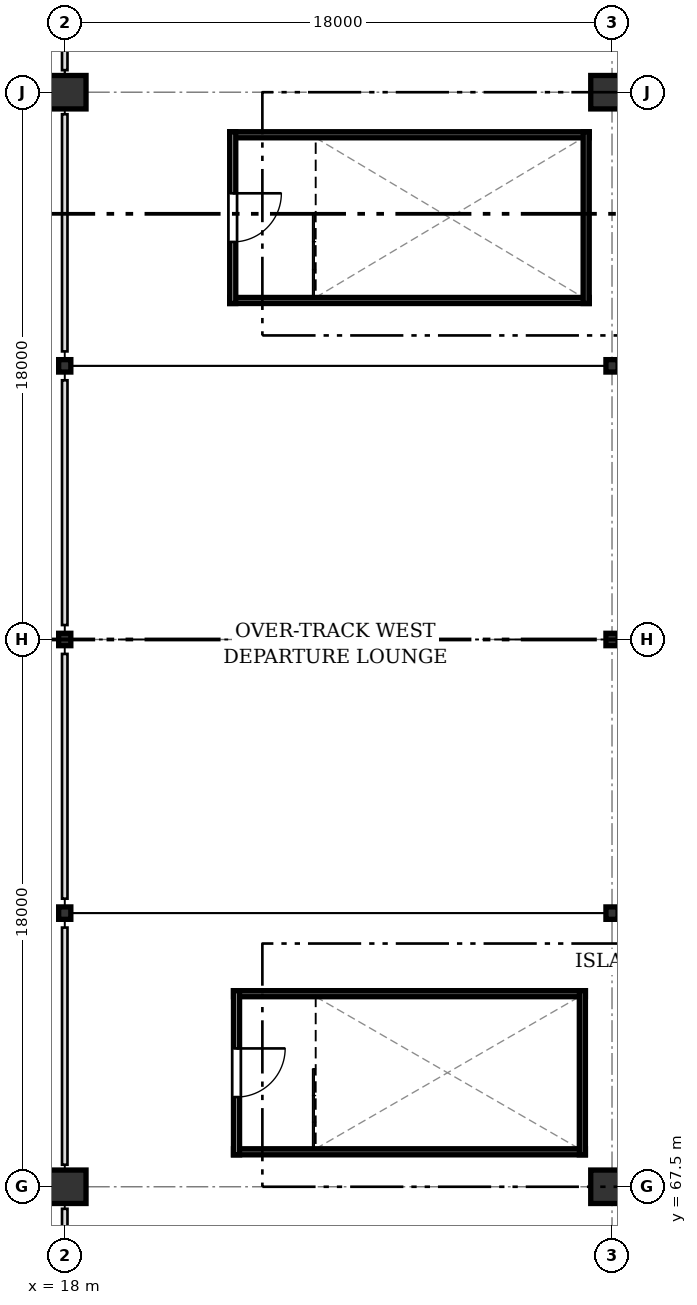
"""IFC4 building model, lengths in metres.
Left out: names, types, materials, properties, quantities, classifications, styles, units other than length and angle.
Written with IfcOpenShell. Run it as: python <this file> out.ifc"""

import sys

from ifc_helpers import new_model, si_unit, direction, frame, frame_2d, origin, origin_2d, place, context, subcontext, project, spatial, rectangle, i_section, extrude, element, fill, save


model = new_model("IFC4")
c1 = context("Model", 3, precision=1e-05, world=origin(), true_north=direction((0.0, 1.0)))
c2 = subcontext(c1, "Body", "Model", "MODEL_VIEW")
j1 = project(units=[si_unit("LENGTHUNIT", "METRE"), si_unit("PLANEANGLEUNIT", "RADIAN")], contexts=[c1])
p1 = place(None, origin())
s1 = spatial("IfcSite", under=j1, at=p1, CompositionType="ELEMENT")
p2 = place(p1, origin())
s2 = spatial("IfcBuilding", under=s1, at=p2, CompositionType="ELEMENT")
p3 = place(p2, frame((0.0, 0.0, 6.6)))
s3 = spatial("IfcBuildingStorey", under=s2, at=p3, CompositionType="ELEMENT", Elevation=6.6)
for number, where, z_axis, x_axis in (
    (1, (18.0, 67.5, 0.0), (0.0, 0.0, 1.0), (1.0, 0.0, 0.0)),
    (2, (18.0, 103.5, 0.0), (0.0, 0.0, 1.0), (1.0, 0.0, 0.0)),
    (3, (36.0, 67.5, 0.0), (0.0, 0.0, 1.0), (1.0, 0.0, 0.0)),
    (4, (36.0, 103.5, 0.0), (0.0, 0.0, 1.0), (1.0, 0.0, 0.0)),
):
    element("IfcColumn", number, at=place(p3, frame(where, z_axis=z_axis, x_axis=x_axis)), inside=s3, PredefinedType="COLUMN", context=c2, shape_type="SweptSolid", body=[
        extrude(rectangle(XDim=1.4, YDim=1.1, at=origin_2d()), origin(), (0.0, 0.0, 1.0), 4.2),
    ])
for number, where, z_axis, x_axis in (
    (5, (18.0, 76.5, -0.68), (0.0, 0.0, 1.0), (1.0, 0.0, 0.0)),
    (6, (18.0, 85.5, -0.68), (0.0, 0.0, 1.0), (1.0, 0.0, 0.0)),
    (7, (18.0, 94.5, -0.68), (0.0, 0.0, 1.0), (1.0, 0.0, 0.0)),
    (8, (36.0, 76.5, -0.68), (0.0, 0.0, 1.0), (1.0, 0.0, 0.0)),
    (9, (36.0, 85.5, -0.68), (0.0, 0.0, 1.0), (1.0, 0.0, 0.0)),
    (10, (36.0, 94.5, -0.68), (0.0, 0.0, 1.0), (1.0, 0.0, 0.0)),
):
    element("IfcColumn", number, at=place(p3, frame(where, z_axis=z_axis, x_axis=x_axis)), inside=s3, PredefinedType="COLUMN", context=c2, shape_type="SweptSolid", body=[
        extrude(i_section(OverallWidth=0.4, OverallDepth=0.408, WebThickness=0.021, FlangeThickness=0.021, FilletRadius=0.022, at=origin_2d()), origin(), (0.0, 0.0, 1.0), 4.03),
    ])
for number, where, z_axis, x_axis in (
    (11, (23.55, 68.65, 0.0), (0.0, 0.0, 1.0), (1.0, 0.0, 0.0)),
    (12, (35.125, 73.85, 0.0), (0.0, 0.0, 1.0), (-1.0, 0.0, 0.0)),
):
    element("IfcWall", number, at=place(p3, frame(where, z_axis=z_axis, x_axis=x_axis)), inside=s3, PredefinedType="SOLIDWALL", context=c2, shape_type="SweptSolid", body=[
        extrude(rectangle(XDim=11.575, YDim=0.2, at=frame_2d((5.788, 0.0))), origin(), (0.0, 0.0, 1.0), 2.45),
    ])
p4 = place(p3, frame((35.025, 68.55, 0.0), z_axis=(0.0, 0.0, 1.0), x_axis=(0.0, 1.0, 0.0)))
e13 = element("IfcWall", 13, at=p4, inside=s3, PredefinedType="SOLIDWALL", context=c2, shape_type="SweptSolid", body=[
    extrude(rectangle(XDim=5.4, YDim=0.2, at=frame_2d((2.7, 0.0))), origin(), (0.0, 0.0, 1.0), 2.45),
])
p5 = place(p3, frame((23.65, 73.95, 0.0), z_axis=(0.0, 0.0, 1.0), x_axis=(0.0, -1.0, 0.0)))
e14 = element("IfcWall", 14, at=p5, inside=s3, PredefinedType="SOLIDWALL", context=c2, shape_type="SweptSolid", body=[
    extrude(rectangle(XDim=5.4, YDim=0.2, at=frame_2d((2.7, 0.0))), origin(), (0.0, 0.0, 1.0), 2.45),
])
p6 = place(p5, frame((1.9, 0.0, 0.0)))
e15 = element("IfcOpeningElement", 15, at=p6, cuts=e14, PredefinedType="OPENING", context=c2, shape_type="SweptSolid", body=[
    extrude(rectangle(XDim=1.6, YDim=2.15, at=frame_2d((0.8, 1.075))), frame((0.0, 0.11, 0.0), z_axis=(0.0, -1.0, 0.0), x_axis=(1.0, 0.0, 0.0)), (0.0, 0.0, 1.0), 0.22),
])
for number, where, z_axis, x_axis in (
    (16, (23.425, 96.65, 0.0), (0.0, 0.0, 1.0), (1.0, 0.0, 0.0)),
    (17, (35.25, 102.1, 0.0), (0.0, 0.0, 1.0), (-1.0, 0.0, 0.0)),
):
    element("IfcWall", number, at=place(p3, frame(where, z_axis=z_axis, x_axis=x_axis)), inside=s3, PredefinedType="SOLIDWALL", context=c2, shape_type="SweptSolid", body=[
        extrude(rectangle(XDim=11.825, YDim=0.2, at=frame_2d((5.913, 0.0))), origin(), (0.0, 0.0, 1.0), 2.45),
    ])
p7 = place(p3, frame((35.15, 96.55, 0.0), z_axis=(0.0, 0.0, 1.0), x_axis=(0.0, 1.0, 0.0)))
e18 = element("IfcWall", 18, at=p7, inside=s3, PredefinedType="SOLIDWALL", context=c2, shape_type="SweptSolid", body=[
    extrude(rectangle(XDim=5.65, YDim=0.2, at=frame_2d((2.825, 0.0))), origin(), (0.0, 0.0, 1.0), 2.45),
])
p8 = place(p3, frame((23.525, 102.2, 0.0), z_axis=(0.0, 0.0, 1.0), x_axis=(0.0, -1.0, 0.0)))
e19 = element("IfcWall", 19, at=p8, inside=s3, PredefinedType="SOLIDWALL", context=c2, shape_type="SweptSolid", body=[
    extrude(rectangle(XDim=5.65, YDim=0.2, at=frame_2d((2.825, 0.0))), origin(), (0.0, 0.0, 1.0), 2.45),
])
p9 = place(p8, frame((2.025, 0.0, 0.0)))
e20 = element("IfcOpeningElement", 20, at=p9, cuts=e19, PredefinedType="OPENING", context=c2, shape_type="SweptSolid", body=[
    extrude(rectangle(XDim=1.6, YDim=2.15, at=frame_2d((0.8, 1.075))), frame((0.0, 0.11, 0.0), z_axis=(0.0, -1.0, 0.0), x_axis=(1.0, 0.0, 0.0)), (0.0, 0.0, 1.0), 0.22),
])
p10 = place(p6, origin())
e21 = element("IfcDoor", 21, at=p10, inside=s3, OperationType="SINGLE_SWING_LEFT", PredefinedType="DOOR", context=c2, shape_type="SweptSolid", body=[
    extrude(rectangle(XDim=1.6, YDim=2.15, at=frame_2d((0.8, 1.075))), frame((0.0, 0.025, 0.0), z_axis=(0.0, -1.0, 0.0), x_axis=(1.0, 0.0, 0.0)), (0.0, 0.0, 1.0), 0.05),
])
fill(e15, e21)
p11 = place(p9, origin())
e22 = element("IfcDoor", 22, at=p11, inside=s3, OperationType="SINGLE_SWING_LEFT", PredefinedType="DOOR", context=c2, shape_type="SweptSolid", body=[
    extrude(rectangle(XDim=1.6, YDim=2.15, at=frame_2d((0.8, 1.075))), frame((0.0, 0.025, 0.0), z_axis=(0.0, -1.0, 0.0), x_axis=(1.0, 0.0, 0.0)), (0.0, 0.0, 1.0), 0.05),
])
fill(e20, e22)
save(model, sys.argv[1])
